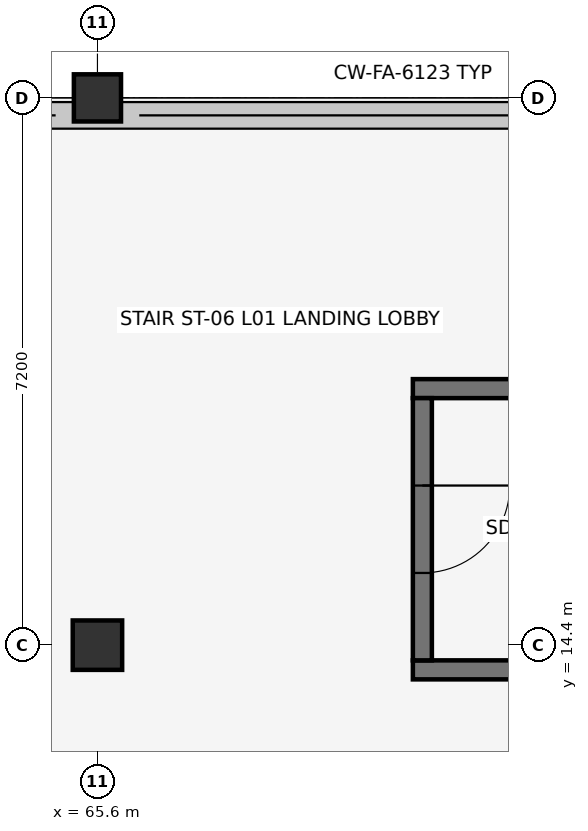
"""IFC4 building model, lengths in metres.
Left out: names, types, materials, properties, quantities, classifications, styles, units other than length and angle.
Written with IfcOpenShell. Run it as: python <this file> out.ifc"""

import sys

from ifc_helpers import new_model, si_unit, direction, frame, frame_2d, origin, origin_2d, place, context, subcontext, project, spatial, rectangle, extrude, element, fill, save


model = new_model("IFC4")
c1 = context("Model", 3, precision=1e-05, world=origin(), true_north=direction((0.0, 1.0)))
c2 = subcontext(c1, "Body", "Model", "MODEL_VIEW")
j1 = project(units=[si_unit("LENGTHUNIT", "METRE"), si_unit("PLANEANGLEUNIT", "RADIAN")], contexts=[c1])
p1 = place(None, origin())
s1 = spatial("IfcSite", under=j1, at=p1, CompositionType="ELEMENT")
p2 = place(p1, origin())
s2 = spatial("IfcBuilding", under=s1, at=p2, CompositionType="ELEMENT")
p3 = place(p2, frame((0.0, 0.0, 5.4)))
s3 = spatial("IfcBuildingStorey", under=s2, at=p3, CompositionType="ELEMENT", Elevation=5.4)
p4 = place(p3, frame((65.6, 14.4, 0.0), z_axis=(0.0, 0.0, 1.0), x_axis=(1.0, 0.0, 0.0)))
e1 = element("IfcColumn", 1, at=p4, inside=s3, PredefinedType="COLUMN", context=c2, shape_type="SweptSolid", body=[
    extrude(rectangle(XDim=0.65, YDim=0.65, at=origin_2d()), origin(), (0.0, 0.0, 1.0), 4.2),
])
p5 = place(p3, frame((65.6, 21.6, 0.0), z_axis=(0.0, 0.0, 1.0), x_axis=(1.0, 0.0, 0.0)))
e2 = element("IfcColumn", 2, at=p5, inside=s3, PredefinedType="COLUMN", context=c2, shape_type="SweptSolid", body=[
    extrude(rectangle(XDim=0.62, YDim=0.62, at=origin_2d()), origin(), (0.0, 0.0, 1.0), 4.2),
])
p6 = place(p3, frame((58.4, 21.37, 0.0), z_axis=(0.0, 0.0, 1.0), x_axis=(1.0, 0.0, 0.0)))
e3 = element("IfcWall", 3, at=p6, inside=s3, PredefinedType="SOLIDWALL", context=c2, shape_type="SweptSolid", body=[
    extrude(rectangle(XDim=50.4, YDim=0.35, at=frame_2d((25.2, 0.0))), origin(), (0.0, 0.0, 1.0), 0.85),
])
for number, where, z_axis, x_axis in (
    (4, (69.75, 14.075, 0.0), (0.0, 0.0, 1.0), (1.0, 0.0, 0.0)),
    (5, (78.65, 17.775, 0.0), (0.0, 0.0, 1.0), (-1.0, 0.0, 0.0)),
):
    element("IfcWall", number, at=place(p3, frame(where, z_axis=z_axis, x_axis=x_axis)), inside=s3, PredefinedType="SHEAR", context=c2, shape_type="SweptSolid", body=[
        extrude(rectangle(XDim=8.9, YDim=0.25, at=frame_2d((4.45, 0.0))), origin(), (0.0, 0.0, 1.0), 3.95),
    ])
p7 = place(p3, frame((69.875, 17.65, 0.0), z_axis=(0.0, 0.0, 1.0), x_axis=(0.0, -1.0, 0.0)))
e6 = element("IfcWall", 6, at=p7, inside=s3, PredefinedType="SHEAR", context=c2, shape_type="SweptSolid", body=[
    extrude(rectangle(XDim=3.45, YDim=0.25, at=frame_2d((1.725, 0.0))), origin(), (0.0, 0.0, 1.0), 3.95),
])
p8 = place(p7, frame((1.15, 0.0, 0.0)))
e7 = element("IfcOpeningElement", 7, at=p8, cuts=e6, PredefinedType="OPENING", context=c2, shape_type="SweptSolid", body=[
    extrude(rectangle(XDim=1.15, YDim=2.15, at=frame_2d((0.575, 1.075))), frame((0.0, 0.137, 0.0), z_axis=(0.0, -1.0, 0.0), x_axis=(1.0, 0.0, 0.0)), (0.0, 0.0, 1.0), 0.274),
])
p9 = place(p8, origin())
e8 = element("IfcDoor", 8, at=p9, inside=s3, OperationType="SINGLE_SWING_LEFT", PredefinedType="DOOR", context=c2, shape_type="SweptSolid", body=[
    extrude(rectangle(XDim=1.15, YDim=2.15, at=frame_2d((0.575, 1.075))), frame((0.0, 0.025, 0.0), z_axis=(0.0, -1.0, 0.0), x_axis=(1.0, 0.0, 0.0)), (0.0, 0.0, 1.0), 0.05),
])
fill(e7, e8)
save(model, sys.argv[1])
